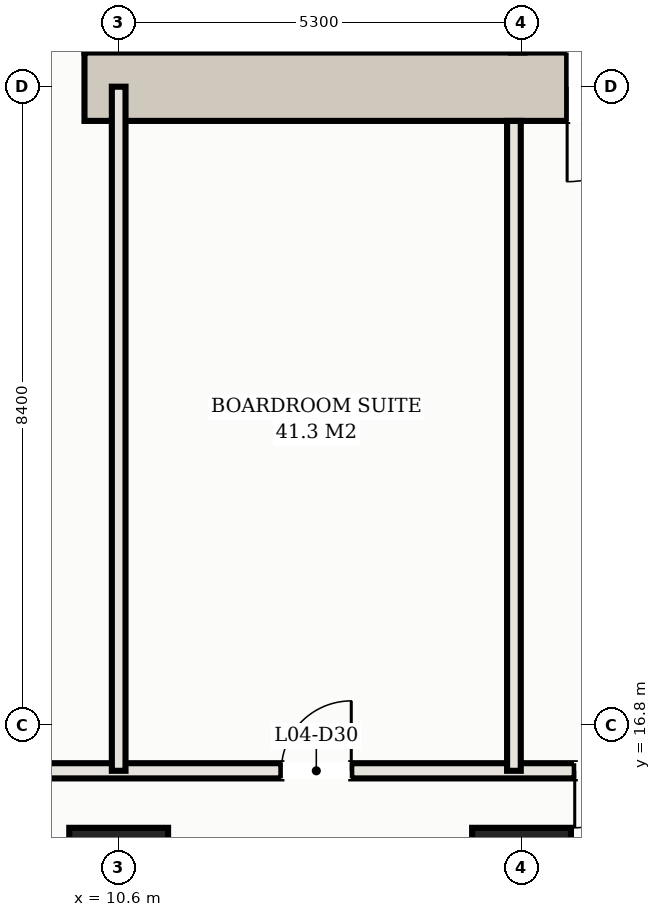
"""IFC4 building model, lengths in metres.
Left out: names, types, materials, properties, quantities, classifications, styles, units other than length and angle.
Written with IfcOpenShell. Run it as: python <this file> out.ifc"""

import sys

from ifc_helpers import new_model, si_unit, direction, frame, frame_2d, origin, origin_2d, place, context, subcontext, project, spatial, rectangle, hollow_rectangle, extrude, element, fill, save


model = new_model("IFC4")
c1 = context("Model", 3, precision=1e-05, world=origin(), true_north=direction((0.0, 1.0)))
c2 = subcontext(c1, "Body", "Model", "MODEL_VIEW")
j1 = project(units=[si_unit("LENGTHUNIT", "METRE"), si_unit("PLANEANGLEUNIT", "RADIAN")], contexts=[c1])
p1 = place(None, origin())
s1 = spatial("IfcSite", under=j1, at=p1, CompositionType="ELEMENT")
p2 = place(p1, origin())
s2 = spatial("IfcBuilding", under=s1, at=p2, CompositionType="ELEMENT")
p3 = place(p2, frame((0.0, 0.0, 19.0)))
s3 = spatial("IfcBuildingStorey", under=s2, at=p3, CompositionType="ELEMENT", Elevation=19.0)
p4 = place(p3, frame((10.15, 25.2, 0.0), z_axis=(0.0, 0.0, 1.0), x_axis=(1.0, 0.0, 0.0)))
e1 = element("IfcWall", 1, at=p4, inside=s3, PredefinedType="SHEAR", context=c2, shape_type="SweptSolid", body=[
    extrude(rectangle(XDim=8.25, YDim=0.9, at=frame_2d((4.125, 0.0))), origin(), (0.0, 0.0, 1.0), 4.86),
])
p5 = place(p4, frame((6.35, 0.0, 0.0)))
e2 = element("IfcOpeningElement", 2, at=p5, cuts=e1, PredefinedType="OPENING", context=c2, shape_type="SweptSolid", body=[
    extrude(rectangle(XDim=1.25, YDim=2.2, at=frame_2d((0.625, 1.1))), frame((0.0, 0.46, 0.0), z_axis=(0.0, -1.0, 0.0), x_axis=(1.0, 0.0, 0.0)), (0.0, 0.0, 1.0), 0.92),
])
for number, where, z_axis, x_axis in (
    (3, (10.6, 14.8, 0.0), (0.0, 0.0, 1.0), (1.0, 0.0, 0.0)),
    (4, (15.9, 14.8, 0.0), (0.0, 0.0, 1.0), (1.0, 0.0, 0.0)),
):
    element("IfcColumn", number, at=place(p3, frame(where, z_axis=z_axis, x_axis=x_axis)), inside=s3, PredefinedType="COLUMN", context=c2, shape_type="SweptSolid", body=[
        extrude(hollow_rectangle(XDim=1.3, YDim=1.3, WallThickness=0.042, at=origin_2d()), origin(), (0.0, 0.0, 1.0), 5.2),
    ])
p6 = place(p3, frame((-3.38, 16.2, 0.0), z_axis=(0.0, 0.0, 1.0), x_axis=(1.0, 0.0, 0.0)))
e5 = element("IfcWall", 5, at=p6, inside=s3, PredefinedType="PARTITIONING", context=c2, shape_type="SweptSolid", body=[
    extrude(rectangle(XDim=59.76, YDim=0.2, at=frame_2d((29.88, 0.0))), origin(), (0.0, 0.0, 1.0), 4.86),
])
p7 = place(p6, frame((16.12, 0.0, 0.0)))
e6 = element("IfcOpeningElement", 6, at=p7, cuts=e5, PredefinedType="OPENING", context=c2, shape_type="SweptSolid", body=[
    extrude(rectangle(XDim=0.92, YDim=2.15, at=frame_2d((0.46, 1.075))), frame((0.0, 0.11, 0.0), z_axis=(0.0, -1.0, 0.0), x_axis=(1.0, 0.0, 0.0)), (0.0, 0.0, 1.0), 0.22),
])
p8 = place(p6, frame((19.98, 0.0, 0.0)))
e7 = element("IfcOpeningElement", 7, at=p8, cuts=e5, PredefinedType="OPENING", context=c2, shape_type="SweptSolid", body=[
    extrude(rectangle(XDim=1.5, YDim=2.25, at=frame_2d((0.75, 1.125))), frame((0.0, 0.11, 0.0), z_axis=(0.0, -1.0, 0.0), x_axis=(1.0, 0.0, 0.0)), (0.0, 0.0, 1.0), 0.22),
])
p9 = place(p6, frame((26.08, 0.0, 0.0)))
e8 = element("IfcOpeningElement", 8, at=p9, cuts=e5, PredefinedType="OPENING", context=c2, shape_type="SweptSolid", body=[
    extrude(rectangle(XDim=1.5, YDim=2.25, at=frame_2d((0.75, 1.125))), frame((0.0, 0.11, 0.0), z_axis=(0.0, -1.0, 0.0), x_axis=(1.0, 0.0, 0.0)), (0.0, 0.0, 1.0), 0.22),
])
p10 = place(p6, frame((31.42, 0.0, 0.0)))
e9 = element("IfcOpeningElement", 9, at=p10, cuts=e5, PredefinedType="OPENING", context=c2, shape_type="SweptSolid", body=[
    extrude(rectangle(XDim=0.92, YDim=2.15, at=frame_2d((0.46, 1.075))), frame((0.0, 0.11, 0.0), z_axis=(0.0, -1.0, 0.0), x_axis=(1.0, 0.0, 0.0)), (0.0, 0.0, 1.0), 0.22),
])
p11 = place(p6, frame((36.37, 0.0, 0.0)))
e10 = element("IfcOpeningElement", 10, at=p11, cuts=e5, PredefinedType="OPENING", context=c2, shape_type="SweptSolid", body=[
    extrude(rectangle(XDim=0.92, YDim=2.15, at=frame_2d((0.46, 1.075))), frame((0.0, 0.11, 0.0), z_axis=(0.0, -1.0, 0.0), x_axis=(1.0, 0.0, 0.0)), (0.0, 0.0, 1.0), 0.22),
])
p12 = place(p6, frame((38.28, 0.0, 0.0)))
e11 = element("IfcOpeningElement", 11, at=p12, cuts=e5, PredefinedType="OPENING", context=c2, shape_type="SweptSolid", body=[
    extrude(rectangle(XDim=1.5, YDim=2.25, at=frame_2d((0.75, 1.125))), frame((0.0, 0.11, 0.0), z_axis=(0.0, -1.0, 0.0), x_axis=(1.0, 0.0, 0.0)), (0.0, 0.0, 1.0), 0.22),
])
p13 = place(p6, frame((42.93, 0.0, 0.0)))
e12 = element("IfcOpeningElement", 12, at=p13, cuts=e5, PredefinedType="OPENING", context=c2, shape_type="SweptSolid", body=[
    extrude(rectangle(XDim=1.5, YDim=2.25, at=frame_2d((0.75, 1.125))), frame((0.0, 0.11, 0.0), z_axis=(0.0, -1.0, 0.0), x_axis=(1.0, 0.0, 0.0)), (0.0, 0.0, 1.0), 0.22),
])
p14 = place(p6, frame((4.44, 0.0, 0.0)))
e13 = element("IfcOpeningElement", 13, at=p14, cuts=e5, PredefinedType="OPENING", context=c2, shape_type="SweptSolid", body=[
    extrude(rectangle(XDim=1.5, YDim=2.25, at=frame_2d((0.75, 1.125))), frame((0.0, 0.11, 0.0), z_axis=(0.0, -1.0, 0.0), x_axis=(1.0, 0.0, 0.0)), (0.0, 0.0, 1.0), 0.22),
])
p15 = place(p3, frame((10.6, 16.2, 0.0), z_axis=(0.0, 0.0, 1.0), x_axis=(0.0, 1.0, 0.0)))
e14 = element("IfcWall", 14, at=p15, inside=s3, PredefinedType="PARTITIONING", context=c2, shape_type="SweptSolid", body=[
    extrude(rectangle(XDim=9.0, YDim=0.18, at=frame_2d((4.5, 0.0))), origin(), (0.0, 0.0, 1.0), 3.055),
])
p16 = place(p3, frame((15.8, 16.2, 0.0), z_axis=(0.0, 0.0, 1.0), x_axis=(0.0, 1.0, 0.0)))
e15 = element("IfcWall", 15, at=p16, inside=s3, PredefinedType="PARTITIONING", context=c2, shape_type="SweptSolid", body=[
    extrude(rectangle(XDim=8.55, YDim=0.18, at=frame_2d((4.275, 0.0))), origin(), (0.0, 0.0, 1.0), 3.055),
])
p17 = place(p5, frame((1.25, 0.0, 0.0), z_axis=(0.0, 0.0, 1.0), x_axis=(-1.0, 0.0, 0.0)))
e16 = element("IfcDoor", 16, at=p17, inside=s3, OperationType="SINGLE_SWING_RIGHT", PredefinedType="DOOR", context=c2, shape_type="SweptSolid", body=[
    extrude(rectangle(XDim=1.25, YDim=2.2, at=frame_2d((0.625, 1.1))), frame((0.0, 0.025, 0.0), z_axis=(0.0, -1.0, 0.0), x_axis=(1.0, 0.0, 0.0)), (0.0, 0.0, 1.0), 0.05),
])
fill(e2, e16)
p18 = place(p7, origin())
e17 = element("IfcDoor", 17, at=p18, inside=s3, OperationType="SINGLE_SWING_RIGHT", PredefinedType="DOOR", context=c2, shape_type="SweptSolid", body=[
    extrude(rectangle(XDim=0.92, YDim=2.15, at=frame_2d((0.46, 1.075))), frame((0.0, 0.025, 0.0), z_axis=(0.0, -1.0, 0.0), x_axis=(1.0, 0.0, 0.0)), (0.0, 0.0, 1.0), 0.05),
])
fill(e6, e17)
p19 = place(p8, frame((1.5, 0.0, 0.0), z_axis=(0.0, 0.0, 1.0), x_axis=(-1.0, 0.0, 0.0)))
e18 = element("IfcDoor", 18, at=p19, inside=s3, OperationType="DOUBLE_DOOR_SINGLE_SWING", PredefinedType="DOOR", context=c2, shape_type="SweptSolid", body=[
    extrude(rectangle(XDim=1.5, YDim=2.25, at=frame_2d((0.75, 1.125))), frame((0.0, 0.025, 0.0), z_axis=(0.0, -1.0, 0.0), x_axis=(1.0, 0.0, 0.0)), (0.0, 0.0, 1.0), 0.05),
])
fill(e7, e18)
save(model, sys.argv[1])
